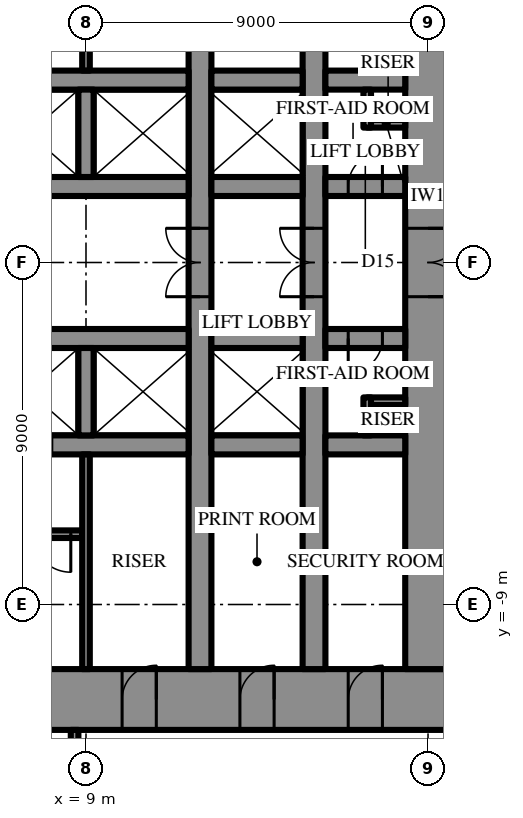
"""IFC4 building model, lengths in metres.
Left out: names, types, materials, properties, quantities, classifications, styles, units other than length and angle.
Written with IfcOpenShell. Run it as: python <this file> out.ifc"""

import sys

from ifc_helpers import new_model, si_unit, direction, frame, frame_2d, origin, place, context, subcontext, project, spatial, rectangle, extrude, element, fill, save


model = new_model("IFC4")
c1 = context("Model", 3, precision=1e-05, world=origin(), true_north=direction((0.0, 1.0)))
c2 = subcontext(c1, "Body", "Model", "MODEL_VIEW")
j1 = project(units=[si_unit("LENGTHUNIT", "METRE"), si_unit("PLANEANGLEUNIT", "RADIAN")], contexts=[c1])
p1 = place(None, origin())
s1 = spatial("IfcSite", under=j1, at=p1, CompositionType="ELEMENT")
p2 = place(p1, origin())
s2 = spatial("IfcBuilding", under=s1, at=p2, CompositionType="ELEMENT")
p3 = place(p2, frame((0.0, 0.0, 144.7)))
s3 = spatial("IfcBuildingStorey", under=s2, at=p3, CompositionType="ELEMENT", Elevation=144.7)
p4 = place(p3, frame((18.6, -11.5, 0.0), z_axis=(0.0, 0.0, 1.0), x_axis=(-1.0, 0.0, 0.0)))
e1 = element("IfcWall", 1, at=p4, inside=s3, PredefinedType="SHEAR", context=c2, shape_type="SweptSolid", body=[
    extrude(rectangle(XDim=37.2, YDim=1.6, at=frame_2d((18.6, 0.0))), origin(), (0.0, 0.0, 1.0), 4.2),
])
p5 = place(p4, frame((19.45, 0.0, 0.0)))
e2 = element("IfcOpeningElement", 2, at=p5, cuts=e1, PredefinedType="OPENING", context=c2, shape_type="SweptSolid", body=[
    extrude(rectangle(XDim=0.9, YDim=2.2, at=frame_2d((0.45, 1.1))), frame((0.0, 0.81, 0.0), z_axis=(0.0, -1.0, 0.0), x_axis=(1.0, 0.0, 0.0)), (0.0, 0.0, 1.0), 1.62),
])
p6 = place(p4, frame((22.45, 0.0, 0.0)))
e3 = element("IfcOpeningElement", 3, at=p6, cuts=e1, PredefinedType="OPENING", context=c2, shape_type="SweptSolid", body=[
    extrude(rectangle(XDim=0.9, YDim=2.2, at=frame_2d((0.45, 1.1))), frame((0.0, 0.81, 0.0), z_axis=(0.0, -1.0, 0.0), x_axis=(1.0, 0.0, 0.0)), (0.0, 0.0, 1.0), 1.62),
])
p7 = place(p4, frame((25.5, 0.0, 0.0)))
e4 = element("IfcOpeningElement", 4, at=p7, cuts=e1, PredefinedType="OPENING", context=c2, shape_type="SweptSolid", body=[
    extrude(rectangle(XDim=1.0, YDim=2.2, at=frame_2d((0.5, 1.1))), frame((0.0, 0.81, 0.0), z_axis=(0.0, -1.0, 0.0), x_axis=(1.0, 0.0, 0.0)), (0.0, 0.0, 1.0), 1.62),
])
p8 = place(p4, frame((1.8, 0.0, 0.0)))
e5 = element("IfcOpeningElement", 5, at=p8, cuts=e1, PredefinedType="OPENING", context=c2, shape_type="SweptSolid", body=[
    extrude(rectangle(XDim=0.9, YDim=2.2, at=frame_2d((0.45, 1.1))), frame((0.0, 0.81, 0.0), z_axis=(0.0, -1.0, 0.0), x_axis=(1.0, 0.0, 0.0)), (0.0, 0.0, 1.0), 1.62),
])
p9 = place(p4, frame((4.65, 0.0, 0.0)))
e6 = element("IfcOpeningElement", 6, at=p9, cuts=e1, PredefinedType="OPENING", context=c2, shape_type="SweptSolid", body=[
    extrude(rectangle(XDim=0.9, YDim=2.2, at=frame_2d((0.45, 1.1))), frame((0.0, 0.81, 0.0), z_axis=(0.0, -1.0, 0.0), x_axis=(1.0, 0.0, 0.0)), (0.0, 0.0, 1.0), 1.62),
])
p10 = place(p4, frame((7.75, 0.0, 0.0)))
e7 = element("IfcOpeningElement", 7, at=p10, cuts=e1, PredefinedType="OPENING", context=c2, shape_type="SweptSolid", body=[
    extrude(rectangle(XDim=0.9, YDim=2.2, at=frame_2d((0.45, 1.1))), frame((0.0, 0.81, 0.0), z_axis=(0.0, -1.0, 0.0), x_axis=(1.0, 0.0, 0.0)), (0.0, 0.0, 1.0), 1.62),
])
p11 = place(p4, frame((28.55, 0.0, 0.0)))
e8 = element("IfcOpeningElement", 8, at=p11, cuts=e1, PredefinedType="OPENING", context=c2, shape_type="SweptSolid", body=[
    extrude(rectangle(XDim=0.9, YDim=2.2, at=frame_2d((0.45, 1.1))), frame((0.0, 0.81, 0.0), z_axis=(0.0, -1.0, 0.0), x_axis=(1.0, 0.0, 0.0)), (0.0, 0.0, 1.0), 1.62),
])
p12 = place(p4, frame((31.65, 0.0, 0.0)))
e9 = element("IfcOpeningElement", 9, at=p12, cuts=e1, PredefinedType="OPENING", context=c2, shape_type="SweptSolid", body=[
    extrude(rectangle(XDim=0.9, YDim=2.2, at=frame_2d((0.45, 1.1))), frame((0.0, 0.81, 0.0), z_axis=(0.0, -1.0, 0.0), x_axis=(1.0, 0.0, 0.0)), (0.0, 0.0, 1.0), 1.62),
])
p13 = place(p4, frame((34.5, 0.0, 0.0)))
e10 = element("IfcOpeningElement", 10, at=p13, cuts=e1, PredefinedType="OPENING", context=c2, shape_type="SweptSolid", body=[
    extrude(rectangle(XDim=0.9, YDim=2.2, at=frame_2d((0.45, 1.1))), frame((0.0, 0.81, 0.0), z_axis=(0.0, -1.0, 0.0), x_axis=(1.0, 0.0, 0.0)), (0.0, 0.0, 1.0), 1.62),
])
p14 = place(p3, frame((18.0, -10.7, 0.0), z_axis=(0.0, 0.0, 1.0), x_axis=(0.0, 1.0, 0.0)))
e11 = element("IfcWall", 11, at=p14, inside=s3, PredefinedType="SHEAR", context=c2, shape_type="SweptSolid", body=[
    extrude(rectangle(XDim=21.4, YDim=1.2, at=frame_2d((10.7, 0.0))), origin(), (0.0, 0.0, 1.0), 4.2),
])
p15 = place(p14, frame((9.8, 0.0, 0.0)))
e12 = element("IfcOpeningElement", 12, at=p15, cuts=e11, PredefinedType="OPENING", context=c2, shape_type="SweptSolid", body=[
    extrude(rectangle(XDim=1.8, YDim=2.4, at=frame_2d((0.9, 1.2))), frame((0.0, 0.61, 0.0), z_axis=(0.0, -1.0, 0.0), x_axis=(1.0, 0.0, 0.0)), (0.0, 0.0, 1.0), 1.22),
])
p16 = place(p3, frame((12.0, -10.7, 0.0), z_axis=(0.0, 0.0, 1.0), x_axis=(0.0, 1.0, 0.0)))
e13 = element("IfcWall", 13, at=p16, inside=s3, PredefinedType="SHEAR", context=c2, shape_type="SweptSolid", body=[
    extrude(rectangle(XDim=21.4, YDim=0.6, at=frame_2d((10.7, 0.0))), origin(), (0.0, 0.0, 1.0), 4.2),
])
p17 = place(p16, frame((9.8, 0.0, 0.0)))
e14 = element("IfcOpeningElement", 14, at=p17, cuts=e13, PredefinedType="OPENING", context=c2, shape_type="SweptSolid", body=[
    extrude(rectangle(XDim=1.8, YDim=2.4, at=frame_2d((0.9, 1.2))), frame((0.0, 0.31, 0.0), z_axis=(0.0, -1.0, 0.0), x_axis=(1.0, 0.0, 0.0)), (0.0, 0.0, 1.0), 0.62),
])
p18 = place(p3, frame((15.0, -10.7, 0.0), z_axis=(0.0, 0.0, 1.0), x_axis=(0.0, 1.0, 0.0)))
e15 = element("IfcWall", 15, at=p18, inside=s3, PredefinedType="SHEAR", context=c2, shape_type="SweptSolid", body=[
    extrude(rectangle(XDim=21.4, YDim=0.6, at=frame_2d((10.7, 0.0))), origin(), (0.0, 0.0, 1.0), 4.2),
])
p19 = place(p18, frame((9.8, 0.0, 0.0)))
e16 = element("IfcOpeningElement", 16, at=p19, cuts=e15, PredefinedType="OPENING", context=c2, shape_type="SweptSolid", body=[
    extrude(rectangle(XDim=1.8, YDim=2.4, at=frame_2d((0.9, 1.2))), frame((0.0, 0.31, 0.0), z_axis=(0.0, -1.0, 0.0), x_axis=(1.0, 0.0, 0.0)), (0.0, 0.0, 1.0), 0.62),
])
p20 = place(p3, frame((-3.2, 2.0, 0.0), z_axis=(0.0, 0.0, 1.0), x_axis=(1.0, 0.0, 0.0)))
e17 = element("IfcWall", 17, at=p20, inside=s3, PredefinedType="SHEAR", context=c2, shape_type="SweptSolid", body=[
    extrude(rectangle(XDim=14.9, YDim=0.5, at=frame_2d((7.45, 0.0))), origin(), (0.0, 0.0, 1.0), 4.2),
])
p21 = place(p20, frame((1.15, 0.0, 0.0)))
e18 = element("IfcOpeningElement", 18, at=p21, cuts=e17, PredefinedType="OPENING", context=c2, shape_type="SweptSolid", body=[
    extrude(rectangle(XDim=1.1, YDim=2.2, at=frame_2d((0.55, 1.1))), frame((0.0, 0.26, 0.0), z_axis=(0.0, -1.0, 0.0), x_axis=(1.0, 0.0, 0.0)), (0.0, 0.0, 1.0), 0.52),
])
p22 = place(p20, frame((4.15, 0.0, 0.0)))
e19 = element("IfcOpeningElement", 19, at=p22, cuts=e17, PredefinedType="OPENING", context=c2, shape_type="SweptSolid", body=[
    extrude(rectangle(XDim=1.1, YDim=2.2, at=frame_2d((0.55, 1.1))), frame((0.0, 0.26, 0.0), z_axis=(0.0, -1.0, 0.0), x_axis=(1.0, 0.0, 0.0)), (0.0, 0.0, 1.0), 0.52),
])
p23 = place(p20, frame((7.15, 0.0, 0.0)))
e20 = element("IfcOpeningElement", 20, at=p23, cuts=e17, PredefinedType="OPENING", context=c2, shape_type="SweptSolid", body=[
    extrude(rectangle(XDim=1.1, YDim=2.2, at=frame_2d((0.55, 1.1))), frame((0.0, 0.26, 0.0), z_axis=(0.0, -1.0, 0.0), x_axis=(1.0, 0.0, 0.0)), (0.0, 0.0, 1.0), 0.52),
])
p24 = place(p20, frame((10.15, 0.0, 0.0)))
e21 = element("IfcOpeningElement", 21, at=p24, cuts=e17, PredefinedType="OPENING", context=c2, shape_type="SweptSolid", body=[
    extrude(rectangle(XDim=1.1, YDim=2.2, at=frame_2d((0.55, 1.1))), frame((0.0, 0.26, 0.0), z_axis=(0.0, -1.0, 0.0), x_axis=(1.0, 0.0, 0.0)), (0.0, 0.0, 1.0), 0.52),
])
p25 = place(p3, frame((12.3, 2.0, 0.0), z_axis=(0.0, 0.0, 1.0), x_axis=(1.0, 0.0, 0.0)))
e22 = element("IfcWall", 22, at=p25, inside=s3, PredefinedType="SHEAR", context=c2, shape_type="SweptSolid", body=[
    extrude(rectangle(XDim=2.4, YDim=0.5, at=frame_2d((1.2, 0.0))), origin(), (0.0, 0.0, 1.0), 4.2),
])
p26 = place(p3, frame((15.3, 2.0, 0.0), z_axis=(0.0, 0.0, 1.0), x_axis=(1.0, 0.0, 0.0)))
e23 = element("IfcWall", 23, at=p26, inside=s3, PredefinedType="SHEAR", context=c2, shape_type="SweptSolid", body=[
    extrude(rectangle(XDim=2.1, YDim=0.5, at=frame_2d((1.05, 0.0))), origin(), (0.0, 0.0, 1.0), 4.2),
])
p27 = place(p26, frame((0.6, 0.0, 0.0)))
e24 = element("IfcOpeningElement", 24, at=p27, cuts=e23, PredefinedType="OPENING", context=c2, shape_type="SweptSolid", body=[
    extrude(rectangle(XDim=0.9, YDim=2.2, at=frame_2d((0.45, 1.1))), frame((0.0, 0.26, 0.0), z_axis=(0.0, -1.0, 0.0), x_axis=(1.0, 0.0, 0.0)), (0.0, 0.0, 1.0), 0.52),
])
p28 = place(p3, frame((-11.7, 4.8, 0.0), z_axis=(0.0, 0.0, 1.0), x_axis=(1.0, 0.0, 0.0)))
e25 = element("IfcWall", 25, at=p28, inside=s3, PredefinedType="SHEAR", context=c2, shape_type="SweptSolid", body=[
    extrude(rectangle(XDim=23.4, YDim=0.5, at=frame_2d((11.7, 0.0))), origin(), (0.0, 0.0, 1.0), 4.2),
])
p29 = place(p28, frame((6.6, 0.0, 0.0)))
e26 = element("IfcOpeningElement", 26, at=p29, cuts=e25, PredefinedType="OPENING", context=c2, shape_type="SweptSolid", body=[
    extrude(rectangle(XDim=1.2, YDim=2.2, at=frame_2d((0.6, 1.1))), frame((0.0, 0.26, 0.0), z_axis=(0.0, -1.0, 0.0), x_axis=(1.0, 0.0, 0.0)), (0.0, 0.0, 1.0), 0.52),
])
p30 = place(p28, frame((3.6, 0.0, 0.0)))
e27 = element("IfcOpeningElement", 27, at=p30, cuts=e25, PredefinedType="OPENING", context=c2, shape_type="SweptSolid", body=[
    extrude(rectangle(XDim=1.2, YDim=2.2, at=frame_2d((0.6, 1.1))), frame((0.0, 0.26, 0.0), z_axis=(0.0, -1.0, 0.0), x_axis=(1.0, 0.0, 0.0)), (0.0, 0.0, 1.0), 0.52),
])
p31 = place(p3, frame((12.3, 4.8, 0.0), z_axis=(0.0, 0.0, 1.0), x_axis=(1.0, 0.0, 0.0)))
e28 = element("IfcWall", 28, at=p31, inside=s3, PredefinedType="SHEAR", context=c2, shape_type="SweptSolid", body=[
    extrude(rectangle(XDim=2.4, YDim=0.5, at=frame_2d((1.2, 0.0))), origin(), (0.0, 0.0, 1.0), 4.2),
])
p32 = place(p3, frame((15.3, 4.8, 0.0), z_axis=(0.0, 0.0, 1.0), x_axis=(1.0, 0.0, 0.0)))
e29 = element("IfcWall", 29, at=p32, inside=s3, PredefinedType="SHEAR", context=c2, shape_type="SweptSolid", body=[
    extrude(rectangle(XDim=2.1, YDim=0.5, at=frame_2d((1.05, 0.0))), origin(), (0.0, 0.0, 1.0), 4.2),
])
p33 = place(p3, frame((9.0, 2.25, 0.0), z_axis=(0.0, 0.0, 1.0), x_axis=(0.0, 1.0, 0.0)))
e30 = element("IfcWall", 30, at=p33, inside=s3, PredefinedType="SHEAR", context=c2, shape_type="SweptSolid", body=[
    extrude(rectangle(XDim=2.3, YDim=0.4, at=frame_2d((1.15, 0.0))), origin(), (0.0, 0.0, 1.0), 4.2),
])
p34 = place(p3, frame((17.4, -2.0, 0.0), z_axis=(0.0, 0.0, 1.0), x_axis=(-1.0, 0.0, 0.0)))
e31 = element("IfcWall", 31, at=p34, inside=s3, PredefinedType="SHEAR", context=c2, shape_type="SweptSolid", body=[
    extrude(rectangle(XDim=2.1, YDim=0.5, at=frame_2d((1.05, 0.0))), origin(), (0.0, 0.0, 1.0), 4.2),
])
p35 = place(p34, frame((0.6, 0.0, 0.0)))
e32 = element("IfcOpeningElement", 32, at=p35, cuts=e31, PredefinedType="OPENING", context=c2, shape_type="SweptSolid", body=[
    extrude(rectangle(XDim=0.9, YDim=2.2, at=frame_2d((0.45, 1.1))), frame((0.0, 0.26, 0.0), z_axis=(0.0, -1.0, 0.0), x_axis=(1.0, 0.0, 0.0)), (0.0, 0.0, 1.0), 0.52),
])
p36 = place(p3, frame((14.7, -2.0, 0.0), z_axis=(0.0, 0.0, 1.0), x_axis=(-1.0, 0.0, 0.0)))
e33 = element("IfcWall", 33, at=p36, inside=s3, PredefinedType="SHEAR", context=c2, shape_type="SweptSolid", body=[
    extrude(rectangle(XDim=2.4, YDim=0.5, at=frame_2d((1.2, 0.0))), origin(), (0.0, 0.0, 1.0), 4.2),
])
p37 = place(p3, frame((11.7, -2.0, 0.0), z_axis=(0.0, 0.0, 1.0), x_axis=(-1.0, 0.0, 0.0)))
e34 = element("IfcWall", 34, at=p37, inside=s3, PredefinedType="SHEAR", context=c2, shape_type="SweptSolid", body=[
    extrude(rectangle(XDim=5.9, YDim=0.5, at=frame_2d((2.95, 0.0))), origin(), (0.0, 0.0, 1.0), 4.2),
])
p38 = place(p3, frame((17.4, -4.8, 0.0), z_axis=(0.0, 0.0, 1.0), x_axis=(-1.0, 0.0, 0.0)))
e35 = element("IfcWall", 35, at=p38, inside=s3, PredefinedType="SHEAR", context=c2, shape_type="SweptSolid", body=[
    extrude(rectangle(XDim=2.1, YDim=0.5, at=frame_2d((1.05, 0.0))), origin(), (0.0, 0.0, 1.0), 4.2),
])
p39 = place(p3, frame((14.7, -4.8, 0.0), z_axis=(0.0, 0.0, 1.0), x_axis=(-1.0, 0.0, 0.0)))
e36 = element("IfcWall", 36, at=p39, inside=s3, PredefinedType="SHEAR", context=c2, shape_type="SweptSolid", body=[
    extrude(rectangle(XDim=2.4, YDim=0.5, at=frame_2d((1.2, 0.0))), origin(), (0.0, 0.0, 1.0), 4.2),
])
p40 = place(p3, frame((11.7, -4.8, 0.0), z_axis=(0.0, 0.0, 1.0), x_axis=(-1.0, 0.0, 0.0)))
e37 = element("IfcWall", 37, at=p40, inside=s3, PredefinedType="SHEAR", context=c2, shape_type="SweptSolid", body=[
    extrude(rectangle(XDim=23.4, YDim=0.5, at=frame_2d((11.7, 0.0))), origin(), (0.0, 0.0, 1.0), 4.2),
])
p41 = place(p40, frame((6.6, 0.0, 0.0)))
e38 = element("IfcOpeningElement", 38, at=p41, cuts=e37, PredefinedType="OPENING", context=c2, shape_type="SweptSolid", body=[
    extrude(rectangle(XDim=1.2, YDim=2.2, at=frame_2d((0.6, 1.1))), frame((0.0, 0.26, 0.0), z_axis=(0.0, -1.0, 0.0), x_axis=(1.0, 0.0, 0.0)), (0.0, 0.0, 1.0), 0.52),
])
p42 = place(p40, frame((3.6, 0.0, 0.0)))
e39 = element("IfcOpeningElement", 39, at=p42, cuts=e37, PredefinedType="OPENING", context=c2, shape_type="SweptSolid", body=[
    extrude(rectangle(XDim=1.2, YDim=2.2, at=frame_2d((0.6, 1.1))), frame((0.0, 0.26, 0.0), z_axis=(0.0, -1.0, 0.0), x_axis=(1.0, 0.0, 0.0)), (0.0, 0.0, 1.0), 0.52),
])
p43 = place(p3, frame((9.0, -2.25, 0.0), z_axis=(0.0, 0.0, 1.0), x_axis=(0.0, -1.0, 0.0)))
e40 = element("IfcWall", 40, at=p43, inside=s3, PredefinedType="SHEAR", context=c2, shape_type="SweptSolid", body=[
    extrude(rectangle(XDim=2.3, YDim=0.4, at=frame_2d((1.15, 0.0))), origin(), (0.0, 0.0, 1.0), 4.2),
])
p44 = place(p3, frame((8.9, -7.15, 0.0), z_axis=(0.0, 0.0, 1.0), x_axis=(-1.0, 0.0, 0.0)))
e41 = element("IfcWall", 41, at=p44, inside=s3, PredefinedType="SHEAR", context=c2, shape_type="SweptSolid", body=[
    extrude(rectangle(XDim=8.6, YDim=0.2, at=frame_2d((4.3, 0.0))), origin(), (0.0, 0.0, 1.0), 4.2),
])
p45 = place(p44, frame((0.3, 0.0, 0.0)))
e42 = element("IfcOpeningElement", 42, at=p45, cuts=e41, PredefinedType="OPENING", context=c2, shape_type="SweptSolid", body=[
    extrude(rectangle(XDim=1.0, YDim=2.2, at=frame_2d((0.5, 1.1))), frame((0.0, 0.11, 0.0), z_axis=(0.0, -1.0, 0.0), x_axis=(1.0, 0.0, 0.0)), (0.0, 0.0, 1.0), 0.22),
])
for number, where, z_axis, x_axis in (
    (43, (9.0, 5.05, 0.0), (0.0, 0.0, 1.0), (0.0, 1.0, 0.0)),
    (44, (9.0, -5.05, 0.0), (0.0, 0.0, 1.0), (0.0, -1.0, 0.0)),
):
    element("IfcWall", number, at=place(p3, frame(where, z_axis=z_axis, x_axis=x_axis)), inside=s3, PredefinedType="PARTITIONING", context=c2, shape_type="SweptSolid", body=[
        extrude(rectangle(XDim=5.65, YDim=0.2, at=frame_2d((2.825, 0.0))), origin(), (0.0, 0.0, 1.0), 4.0),
    ])
for number, where, z_axis, x_axis in (
    (45, (16.4, 3.65, 0.0), (0.0, 0.0, 1.0), (1.0, 0.0, 0.0)),
    (46, (16.4, 3.55, 0.0), (0.0, 0.0, 1.0), (0.0, 1.0, 0.0)),
    (47, (17.4, -3.65, 0.0), (0.0, 0.0, 1.0), (-1.0, 0.0, 0.0)),
    (48, (16.4, -3.55, 0.0), (0.0, 0.0, 1.0), (0.0, -1.0, 0.0)),
):
    element("IfcWall", number, at=place(p3, frame(where, z_axis=z_axis, x_axis=x_axis)), inside=s3, PredefinedType="PARTITIONING", context=c2, shape_type="SweptSolid", body=[
        extrude(rectangle(XDim=1.0, YDim=0.2, at=frame_2d((0.5, 0.0))), origin(), (0.0, 0.0, 1.0), 4.0),
    ])
p46 = place(p3, frame((8.7, -12.3, 0.0), z_axis=(0.0, 0.0, 1.0), x_axis=(0.0, -1.0, 0.0)))
e49 = element("IfcWall", 49, at=p46, inside=s3, PredefinedType="PARTITIONING", context=c2, shape_type="SweptSolid", body=[
    extrude(rectangle(XDim=19.0, YDim=0.2, at=frame_2d((9.5, 0.0))), origin(), (0.0, 0.0, 1.0), 4.0),
])
p47 = place(p46, frame((1.4, 0.0, 0.0)))
e50 = element("IfcOpeningElement", 50, at=p47, cuts=e49, PredefinedType="OPENING", context=c2, shape_type="SweptSolid", body=[
    extrude(rectangle(XDim=1.0, YDim=2.2, at=frame_2d((0.5, 1.1))), frame((0.0, 0.11, 0.0), z_axis=(0.0, -1.0, 0.0), x_axis=(1.0, 0.0, 0.0)), (0.0, 0.0, 1.0), 0.22),
])
p48 = place(p15, frame((1.8, 0.0, 0.0), z_axis=(0.0, 0.0, 1.0), x_axis=(-1.0, 0.0, 0.0)))
e51 = element("IfcDoor", 51, at=p48, inside=s3, OperationType="DOUBLE_DOOR_SINGLE_SWING", PredefinedType="DOOR", context=c2, shape_type="SweptSolid", body=[
    extrude(rectangle(XDim=1.8, YDim=2.4, at=frame_2d((0.9, 1.2))), frame((0.0, 0.025, 0.0), z_axis=(0.0, -1.0, 0.0), x_axis=(1.0, 0.0, 0.0)), (0.0, 0.0, 1.0), 0.05),
])
fill(e12, e51)
p49 = place(p45, origin())
e52 = element("IfcDoor", 52, at=p49, inside=s3, OperationType="SINGLE_SWING_RIGHT", PredefinedType="DOOR", context=c2, shape_type="SweptSolid", body=[
    extrude(rectangle(XDim=1.0, YDim=2.2, at=frame_2d((0.5, 1.1))), frame((0.0, 0.025, 0.0), z_axis=(0.0, -1.0, 0.0), x_axis=(1.0, 0.0, 0.0)), (0.0, 0.0, 1.0), 0.05),
])
fill(e42, e52)
p50 = place(p8, frame((0.9, 0.0, 0.0), z_axis=(0.0, 0.0, 1.0), x_axis=(-1.0, 0.0, 0.0)))
e53 = element("IfcDoor", 53, at=p50, inside=s3, OperationType="SINGLE_SWING_LEFT", PredefinedType="DOOR", context=c2, shape_type="SweptSolid", body=[
    extrude(rectangle(XDim=0.9, YDim=2.2, at=frame_2d((0.45, 1.1))), frame((0.0, 0.025, 0.0), z_axis=(0.0, -1.0, 0.0), x_axis=(1.0, 0.0, 0.0)), (0.0, 0.0, 1.0), 0.05),
])
fill(e5, e53)
p51 = place(p9, frame((0.9, 0.0, 0.0), z_axis=(0.0, 0.0, 1.0), x_axis=(-1.0, 0.0, 0.0)))
e54 = element("IfcDoor", 54, at=p51, inside=s3, OperationType="SINGLE_SWING_LEFT", PredefinedType="DOOR", context=c2, shape_type="SweptSolid", body=[
    extrude(rectangle(XDim=0.9, YDim=2.2, at=frame_2d((0.45, 1.1))), frame((0.0, 0.025, 0.0), z_axis=(0.0, -1.0, 0.0), x_axis=(1.0, 0.0, 0.0)), (0.0, 0.0, 1.0), 0.05),
])
fill(e6, e54)
p52 = place(p10, frame((0.9, 0.0, 0.0), z_axis=(0.0, 0.0, 1.0), x_axis=(-1.0, 0.0, 0.0)))
e55 = element("IfcDoor", 55, at=p52, inside=s3, OperationType="SINGLE_SWING_LEFT", PredefinedType="DOOR", context=c2, shape_type="SweptSolid", body=[
    extrude(rectangle(XDim=0.9, YDim=2.2, at=frame_2d((0.45, 1.1))), frame((0.0, 0.025, 0.0), z_axis=(0.0, -1.0, 0.0), x_axis=(1.0, 0.0, 0.0)), (0.0, 0.0, 1.0), 0.05),
])
fill(e7, e55)
p53 = place(p27, origin())
e56 = element("IfcDoor", 56, at=p53, inside=s3, OperationType="SINGLE_SWING_LEFT", PredefinedType="DOOR", context=c2, shape_type="SweptSolid", body=[
    extrude(rectangle(XDim=0.9, YDim=2.2, at=frame_2d((0.45, 1.1))), frame((0.0, 0.025, 0.0), z_axis=(0.0, -1.0, 0.0), x_axis=(1.0, 0.0, 0.0)), (0.0, 0.0, 1.0), 0.05),
])
fill(e24, e56)
p54 = place(p35, origin())
e57 = element("IfcDoor", 57, at=p54, inside=s3, OperationType="SINGLE_SWING_LEFT", PredefinedType="DOOR", context=c2, shape_type="SweptSolid", body=[
    extrude(rectangle(XDim=0.9, YDim=2.2, at=frame_2d((0.45, 1.1))), frame((0.0, 0.025, 0.0), z_axis=(0.0, -1.0, 0.0), x_axis=(1.0, 0.0, 0.0)), (0.0, 0.0, 1.0), 0.05),
])
fill(e32, e57)
p55 = place(p17, origin())
e58 = element("IfcDoor", 58, at=p55, inside=s3, OperationType="DOUBLE_DOOR_SINGLE_SWING", PredefinedType="DOOR", context=c2, shape_type="SweptSolid", body=[
    extrude(rectangle(XDim=1.8, YDim=2.4, at=frame_2d((0.9, 1.2))), frame((0.0, 0.025, 0.0), z_axis=(0.0, -1.0, 0.0), x_axis=(1.0, 0.0, 0.0)), (0.0, 0.0, 1.0), 0.05),
])
fill(e14, e58)
p56 = place(p19, origin())
e59 = element("IfcDoor", 59, at=p56, inside=s3, OperationType="DOUBLE_DOOR_SINGLE_SWING", PredefinedType="DOOR", context=c2, shape_type="SweptSolid", body=[
    extrude(rectangle(XDim=1.8, YDim=2.4, at=frame_2d((0.9, 1.2))), frame((0.0, 0.025, 0.0), z_axis=(0.0, -1.0, 0.0), x_axis=(1.0, 0.0, 0.0)), (0.0, 0.0, 1.0), 0.05),
])
fill(e16, e59)
save(model, sys.argv[1])
